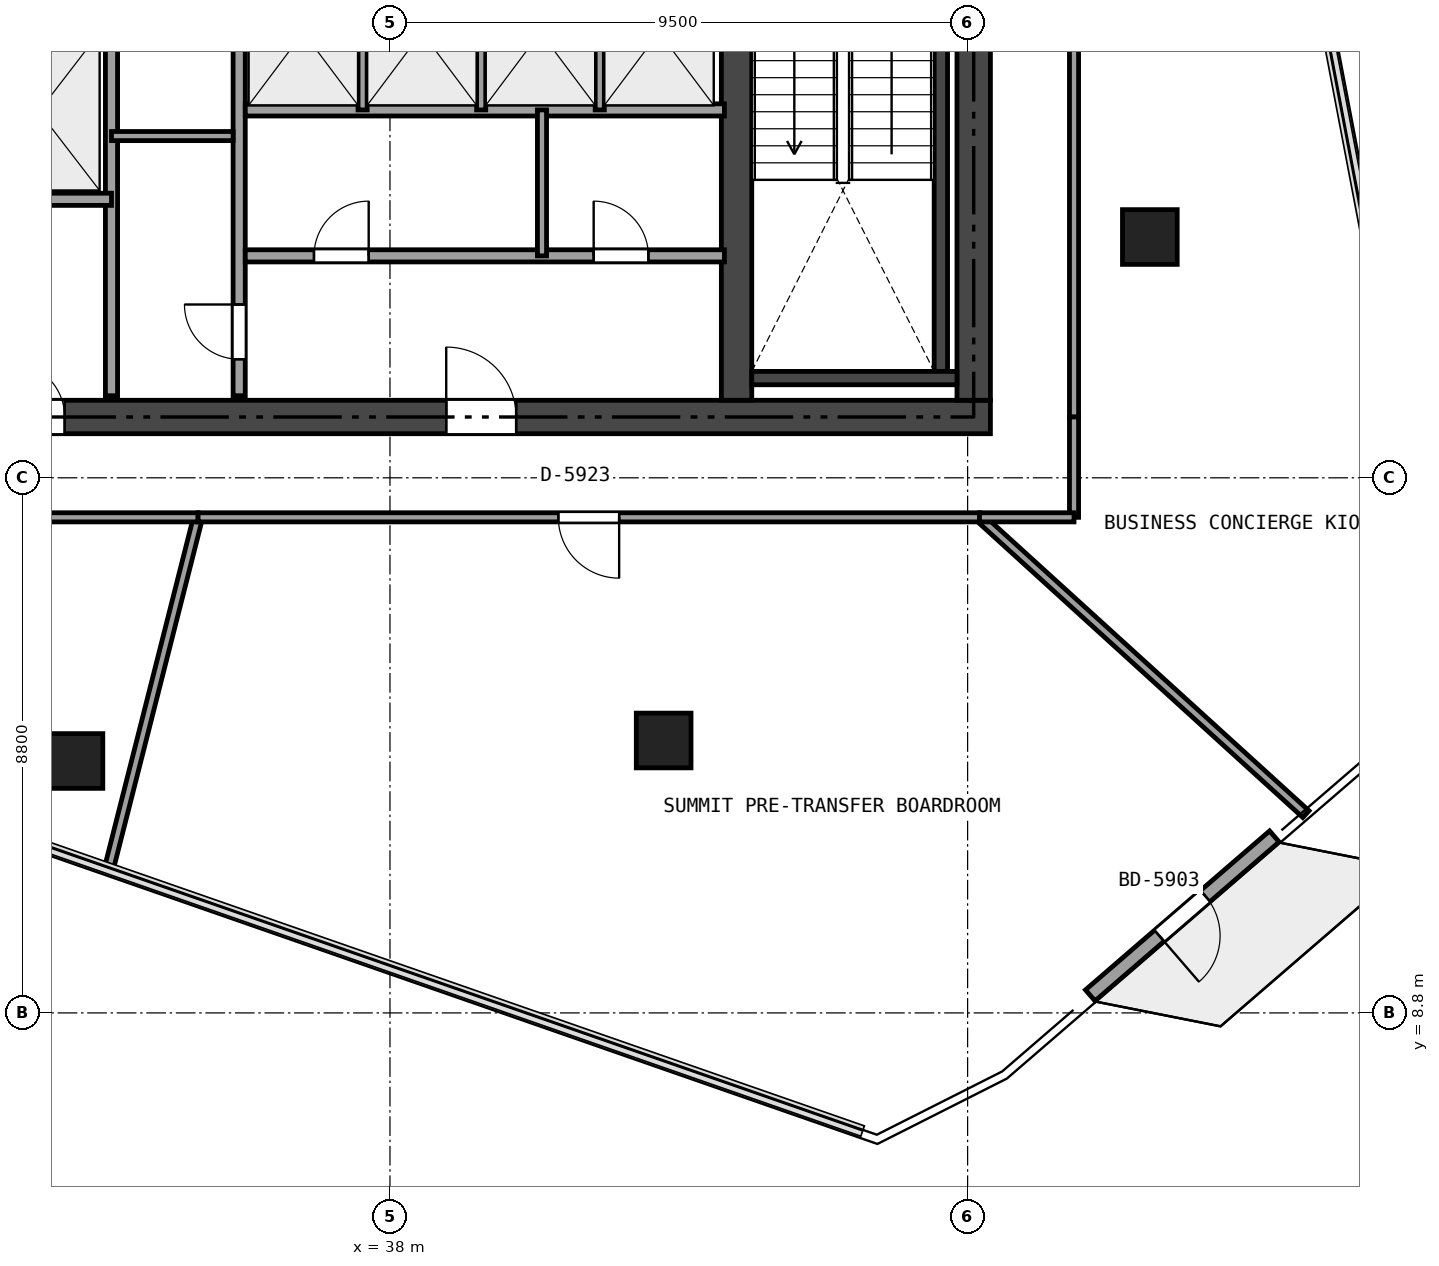
"""IFC4 building model, lengths in metres.
Left out: names, types, materials, properties, quantities, classifications, styles, units other than length and angle.
Written with IfcOpenShell. Run it as: python <this file> out.ifc"""

import sys

from ifc_helpers import new_model, si_unit, direction, frame, frame_2d, origin, origin_2d, place, context, subcontext, project, spatial, rectangle, extrude, element, fill, save


model = new_model("IFC4")
c1 = context("Model", 3, precision=1e-05, world=origin(), true_north=direction((0.0, 1.0)))
c2 = subcontext(c1, "Body", "Model", "MODEL_VIEW")
j1 = project(units=[si_unit("LENGTHUNIT", "METRE"), si_unit("PLANEANGLEUNIT", "RADIAN")], contexts=[c1])
p1 = place(None, origin())
s1 = spatial("IfcSite", under=j1, at=p1, CompositionType="ELEMENT")
p2 = place(p1, origin())
s2 = spatial("IfcBuilding", under=s1, at=p2, CompositionType="ELEMENT")
p3 = place(p2, frame((0.0, 0.0, 220.2)))
s3 = spatial("IfcBuildingStorey", under=s2, at=p3, CompositionType="ELEMENT", Elevation=220.2)
p4 = place(p3, frame((26.525, 18.6, 0.0), z_axis=(0.0, 0.0, 1.0), x_axis=(1.0, 0.0, 0.0)))
e1 = element("IfcWall", 1, at=p4, inside=s3, PredefinedType="SHEAR", context=c2, shape_type="SweptSolid", body=[
    extrude(rectangle(XDim=21.35, YDim=0.55, at=frame_2d((10.675, 0.0))), origin(), (0.0, 0.0, 1.0), 3.24),
])
p5 = place(p4, frame((12.4, 0.0, 0.0)))
e2 = element("IfcOpeningElement", 2, at=p5, cuts=e1, PredefinedType="OPENING", context=c2, shape_type="SweptSolid", body=[
    extrude(rectangle(XDim=1.15, YDim=2.15, at=frame_2d((0.575, 1.075))), frame((0.0, 0.285, 0.0), z_axis=(0.0, -1.0, 0.0), x_axis=(1.0, 0.0, 0.0)), (0.0, 0.0, 1.0), 0.57),
])
p6 = place(p4, frame((5.225, 0.0, 0.0)))
e3 = element("IfcOpeningElement", 3, at=p6, cuts=e1, PredefinedType="OPENING", context=c2, shape_type="SweptSolid", body=[
    extrude(rectangle(XDim=0.9, YDim=2.1, at=frame_2d((0.45, 1.05))), frame((0.0, 0.285, 0.0), z_axis=(0.0, -1.0, 0.0), x_axis=(1.0, 0.0, 0.0)), (0.0, 0.0, 1.0), 0.57),
])
p7 = place(p3, frame((47.6, 18.875, 0.0), z_axis=(0.0, 0.0, 1.0), x_axis=(0.0, 1.0, 0.0)))
e4 = element("IfcWall", 4, at=p7, inside=s3, PredefinedType="SHEAR", context=c2, shape_type="SweptSolid", body=[
    extrude(rectangle(XDim=15.05, YDim=0.55, at=frame_2d((7.525, 0.0))), origin(), (0.0, 0.0, 1.0), 3.24),
])
p8 = place(p7, frame((6.625, 0.0, 0.0)))
e5 = element("IfcOpeningElement", 5, at=p8, cuts=e4, PredefinedType="OPENING", context=c2, shape_type="SweptSolid", body=[
    extrude(rectangle(XDim=1.1, YDim=2.15, at=frame_2d((0.55, 1.075))), frame((0.0, 0.285, 0.0), z_axis=(0.0, -1.0, 0.0), x_axis=(1.0, 0.0, 0.0)), (0.0, 0.0, 1.0), 0.57),
])
p9 = place(p7, frame((8.525, 0.0, 0.0)))
e6 = element("IfcOpeningElement", 6, at=p9, cuts=e4, PredefinedType="OPENING", context=c2, shape_type="SweptSolid", body=[
    extrude(rectangle(XDim=0.9, YDim=2.1, at=frame_2d((0.45, 1.05))), frame((0.0, 0.285, 0.0), z_axis=(0.0, -1.0, 0.0), x_axis=(1.0, 0.0, 0.0)), (0.0, 0.0, 1.0), 0.57),
])
p10 = place(p7, frame((13.175, 0.0, 0.0)))
e7 = element("IfcOpeningElement", 7, at=p10, cuts=e4, PredefinedType="OPENING", context=c2, shape_type="SweptSolid", body=[
    extrude(rectangle(XDim=0.9, YDim=2.1, at=frame_2d((0.45, 1.05))), frame((0.0, 0.285, 0.0), z_axis=(0.0, -1.0, 0.0), x_axis=(1.0, 0.0, 0.0)), (0.0, 0.0, 1.0), 0.57),
])
p11 = place(p3, frame((43.7, 18.875, 0.0), z_axis=(0.0, 0.0, 1.0), x_axis=(0.0, 1.0, 0.0)))
e8 = element("IfcWall", 8, at=p11, inside=s3, PredefinedType="SHEAR", context=c2, shape_type="SweptSolid", body=[
    extrude(rectangle(XDim=15.05, YDim=0.5, at=frame_2d((7.525, 0.0))), origin(), (0.0, 0.0, 1.0), 3.24),
])
p12 = place(p11, frame((8.125, 0.0, 0.0)))
e9 = element("IfcOpeningElement", 9, at=p12, cuts=e8, PredefinedType="OPENING", context=c2, shape_type="SweptSolid", body=[
    extrude(rectangle(XDim=0.9, YDim=2.1, at=frame_2d((0.45, 1.05))), frame((0.0, 0.26, 0.0), z_axis=(0.0, -1.0, 0.0), x_axis=(1.0, 0.0, 0.0)), (0.0, 0.0, 1.0), 0.52),
])
p13 = place(p3, frame((47.06, 19.35, 0.0), z_axis=(0.0, 0.0, 1.0), x_axis=(0.0, 1.0, 0.0)))
e10 = element("IfcWall", 10, at=p13, inside=s3, PredefinedType="SHEAR", context=c2, shape_type="SweptSolid", body=[
    extrude(rectangle(XDim=5.9, YDim=0.22, at=frame_2d((2.95, 0.0))), origin(), (0.0, 0.0, 1.0), 3.24),
])
p14 = place(p3, frame((43.95, 19.24, 0.0), z_axis=(0.0, 0.0, 1.0), x_axis=(1.0, 0.0, 0.0)))
e11 = element("IfcWall", 11, at=p14, inside=s3, PredefinedType="SHEAR", context=c2, shape_type="SweptSolid", body=[
    extrude(rectangle(XDim=3.375, YDim=0.22, at=frame_2d((1.688, 0.0))), origin(), (0.0, 0.0, 1.0), 3.24),
])
for number, where, z_axis, x_axis in (
    (12, (32.827, 12.943, 0.0), (0.0, 0.0, 1.0), (1.0, 0.0, 0.0)),
    (13, (42.501, 13.28, 0.0), (0.0, 0.0, 1.0), (1.0, 0.0, 0.0)),
    (14, (50.497, 21.56, 0.0), (0.0, 0.0, 1.0), (1.0, 0.0, 0.0)),
):
    element("IfcColumn", number, at=place(p3, frame(where, z_axis=z_axis, x_axis=x_axis)), inside=s3, PredefinedType="COLUMN", context=c2, shape_type="SweptSolid", body=[
        extrude(rectangle(XDim=0.9, YDim=0.9, at=origin_2d()), origin(), (0.0, 0.0, 1.0), 3.24),
    ])
p15 = place(p3, frame((52.545, 11.702, 0.0), z_axis=(0.0, 0.0, 1.0), x_axis=(-0.756938273596, -0.653486380857, 0.0)))
e15 = element("IfcWall", 15, at=p15, inside=s3, PredefinedType="SOLIDWALL", context=c2, shape_type="SweptSolid", body=[
    extrude(rectangle(XDim=4.0, YDim=0.24, at=frame_2d((2.0, 0.0))), origin(), (0.0, 0.0, 1.0), 3.24),
])
p16 = place(p15, frame((1.5, 0.0, 0.0)))
e16 = element("IfcOpeningElement", 16, at=p16, cuts=e15, PredefinedType="OPENING", context=c2, shape_type="SweptSolid", body=[
    extrude(rectangle(XDim=1.0, YDim=2.15, at=frame_2d((0.5, 1.075))), frame((0.0, 0.13, 0.0), z_axis=(0.0, -1.0, 0.0), x_axis=(1.0, 0.0, 0.0)), (0.0, 0.0, 1.0), 0.26),
])
p17 = place(p3, frame((35.52, 18.95, 0.0), z_axis=(0.0, 0.0, 1.0), x_axis=(0.0, 1.0, 0.0)))
e17 = element("IfcWall", 17, at=p17, inside=s3, PredefinedType="SOLIDWALL", context=c2, shape_type="SweptSolid", body=[
    extrude(rectangle(XDim=14.9, YDim=0.2, at=frame_2d((7.45, 0.0))), origin(), (0.0, 0.0, 1.0), 2.761),
])
p18 = place(p17, frame((7.755, 0.0, 0.0)))
e18 = element("IfcOpeningElement", 18, at=p18, cuts=e17, PredefinedType="OPENING", context=c2, shape_type="SweptSolid", body=[
    extrude(rectangle(XDim=0.95, YDim=2.15, at=frame_2d((0.475, 1.075))), frame((0.0, 0.11, 0.0), z_axis=(0.0, -1.0, 0.0), x_axis=(1.0, 0.0, 0.0)), (0.0, 0.0, 1.0), 0.22),
])
p19 = place(p17, frame((0.6, 0.0, 0.0)))
e19 = element("IfcOpeningElement", 19, at=p19, cuts=e17, PredefinedType="OPENING", context=c2, shape_type="SweptSolid", body=[
    extrude(rectangle(XDim=0.9, YDim=2.1, at=frame_2d((0.45, 1.05))), frame((0.0, 0.11, 0.0), z_axis=(0.0, -1.0, 0.0), x_axis=(1.0, 0.0, 0.0)), (0.0, 0.0, 1.0), 0.22),
])
p20 = place(p3, frame((33.42, 18.95, 0.0), z_axis=(0.0, 0.0, 1.0), x_axis=(0.0, 1.0, 0.0)))
e20 = element("IfcWall", 20, at=p20, inside=s3, PredefinedType="SOLIDWALL", context=c2, shape_type="SweptSolid", body=[
    extrude(rectangle(XDim=6.13, YDim=0.2, at=frame_2d((3.065, 0.0))), origin(), (0.0, 0.0, 1.0), 2.761),
])
p21 = place(p3, frame((31.0, 22.18, 0.0), z_axis=(0.0, 0.0, 1.0), x_axis=(1.0, 0.0, 0.0)))
e21 = element("IfcWall", 21, at=p21, inside=s3, PredefinedType="SOLIDWALL", context=c2, shape_type="SweptSolid", body=[
    extrude(rectangle(XDim=2.42, YDim=0.2, at=frame_2d((1.21, 0.0))), origin(), (0.0, 0.0, 1.0), 3.24),
])
p22 = place(p3, frame((33.42, 23.22, 0.0), z_axis=(0.0, 0.0, 1.0), x_axis=(1.0, 0.0, 0.0)))
e22 = element("IfcWall", 22, at=p22, inside=s3, PredefinedType="PARTITIONING", context=c2, shape_type="SweptSolid", body=[
    extrude(rectangle(XDim=2.0, YDim=0.15, at=frame_2d((1.0, 0.0))), origin(), (0.0, 0.0, 1.0), 3.24),
])
p23 = place(p3, frame((35.62, 23.65, 0.0), z_axis=(0.0, 0.0, 1.0), x_axis=(1.0, 0.0, 0.0)))
e23 = element("IfcWall", 23, at=p23, inside=s3, PredefinedType="SOLIDWALL", context=c2, shape_type="SweptSolid", body=[
    extrude(rectangle(XDim=7.88, YDim=0.2, at=frame_2d((3.94, 0.0))), origin(), (0.0, 0.0, 1.0), 2.761),
])
p24 = place(p3, frame((35.62, 21.25, 0.0), z_axis=(0.0, 0.0, 1.0), x_axis=(1.0, 0.0, 0.0)))
e24 = element("IfcWall", 24, at=p24, inside=s3, PredefinedType="SOLIDWALL", context=c2, shape_type="SweptSolid", body=[
    extrude(rectangle(XDim=7.88, YDim=0.2, at=frame_2d((3.94, 0.0))), origin(), (0.0, 0.0, 1.0), 3.24),
])
p25 = place(p24, frame((1.13, 0.0, 0.0)))
e25 = element("IfcOpeningElement", 25, at=p25, cuts=e24, PredefinedType="OPENING", context=c2, shape_type="SweptSolid", body=[
    extrude(rectangle(XDim=0.9, YDim=2.1, at=frame_2d((0.45, 1.05))), frame((0.0, 0.11, 0.0), z_axis=(0.0, -1.0, 0.0), x_axis=(1.0, 0.0, 0.0)), (0.0, 0.0, 1.0), 0.22),
])
p26 = place(p24, frame((5.73, 0.0, 0.0)))
e26 = element("IfcOpeningElement", 26, at=p26, cuts=e24, PredefinedType="OPENING", context=c2, shape_type="SweptSolid", body=[
    extrude(rectangle(XDim=0.9, YDim=2.1, at=frame_2d((0.45, 1.05))), frame((0.0, 0.11, 0.0), z_axis=(0.0, -1.0, 0.0), x_axis=(1.0, 0.0, 0.0)), (0.0, 0.0, 1.0), 0.22),
])
for number, where, z_axis, x_axis in (
    (27, (37.55, 23.65, 0.0), (0.0, 0.0, 1.0), (0.0, 1.0, 0.0)),
    (28, (39.5, 23.65, 0.0), (0.0, 0.0, 1.0), (0.0, 1.0, 0.0)),
    (29, (41.45, 23.65, 0.0), (0.0, 0.0, 1.0), (0.0, 1.0, 0.0)),
):
    element("IfcWall", number, at=place(p3, frame(where, z_axis=z_axis, x_axis=x_axis)), inside=s3, PredefinedType="PARTITIONING", context=c2, shape_type="SweptSolid", body=[
        extrude(rectangle(XDim=2.55, YDim=0.15, at=frame_2d((1.275, 0.0))), origin(), (0.0, 0.0, 1.0), 2.761),
    ])
p27 = place(p3, frame((40.5, 21.25, 0.0), z_axis=(0.0, 0.0, 1.0), x_axis=(0.0, 1.0, 0.0)))
e30 = element("IfcWall", 30, at=p27, inside=s3, PredefinedType="PARTITIONING", context=c2, shape_type="SweptSolid", body=[
    extrude(rectangle(XDim=2.4, YDim=0.15, at=frame_2d((1.2, 0.0))), origin(), (0.0, 0.0, 1.0), 2.761),
])
p28 = place(p3, frame((33.367, 11.134, 0.0), z_axis=(0.0, 0.0, 1.0), x_axis=(0.246152632785, 0.969231077387, 0.0)))
e31 = element("IfcWall", 31, at=p28, inside=s3, PredefinedType="PARTITIONING", context=c2, shape_type="SweptSolid", body=[
    extrude(rectangle(XDim=6.0, YDim=0.15, at=frame_2d((3.0, 0.0))), origin(), (0.0, 0.0, 1.0), 2.825),
])
p29 = place(p3, frame((34.844, 16.95, 0.0), z_axis=(0.0, 0.0, 1.0), x_axis=(-1.0, 0.0, 0.0)))
e32 = element("IfcWall", 32, at=p29, inside=s3, PredefinedType="PARTITIONING", context=c2, shape_type="SweptSolid", body=[
    extrude(rectangle(XDim=8.044, YDim=0.15, at=frame_2d((4.022, 0.0))), origin(), (0.0, 0.0, 1.0), 2.617),
])
p30 = place(p29, frame((3.522, 0.0, 0.0)))
e33 = element("IfcOpeningElement", 33, at=p30, cuts=e32, PredefinedType="OPENING", context=c2, shape_type="SweptSolid", body=[
    extrude(rectangle(XDim=1.0, YDim=2.15, at=frame_2d((0.5, 1.075))), frame((0.0, 0.085, 0.0), z_axis=(0.0, -1.0, 0.0), x_axis=(1.0, 0.0, 0.0)), (0.0, 0.0, 1.0), 0.17),
])
p31 = place(p3, frame((53.064, 12.069, 0.0), z_axis=(0.0, 0.0, 1.0), x_axis=(-0.739937028387, 0.672676143491, 0.0)))
e34 = element("IfcWall", 34, at=p31, inside=s3, PredefinedType="PARTITIONING", context=c2, shape_type="SweptSolid", body=[
    extrude(rectangle(XDim=7.256, YDim=0.15, at=frame_2d((3.628, 0.0))), origin(), (0.0, 0.0, 1.0), 3.24),
])
p32 = place(p3, frame((47.695, 16.95, 0.0), z_axis=(0.0, 0.0, 1.0), x_axis=(-1.0, 0.0, 0.0)))
e35 = element("IfcWall", 35, at=p32, inside=s3, PredefinedType="PARTITIONING", context=c2, shape_type="SweptSolid", body=[
    extrude(rectangle(XDim=12.851, YDim=0.15, at=frame_2d((6.426, 0.0))), origin(), (0.0, 0.0, 1.0), 2.617),
])
p33 = place(p32, frame((5.926, 0.0, 0.0)))
e36 = element("IfcOpeningElement", 36, at=p33, cuts=e35, PredefinedType="OPENING", context=c2, shape_type="SweptSolid", body=[
    extrude(rectangle(XDim=1.0, YDim=2.15, at=frame_2d((0.5, 1.075))), frame((0.0, 0.085, 0.0), z_axis=(0.0, -1.0, 0.0), x_axis=(1.0, 0.0, 0.0)), (0.0, 0.0, 1.0), 0.17),
])
p34 = place(p3, frame((49.25, 34.2, 0.0), z_axis=(0.0, 0.0, 1.0), x_axis=(0.0, -1.0, 0.0)))
e37 = element("IfcWall", 37, at=p34, inside=s3, PredefinedType="PARTITIONING", context=c2, shape_type="SweptSolid", body=[
    extrude(rectangle(XDim=15.6, YDim=0.15, at=frame_2d((7.8, 0.0))), origin(), (0.0, 0.0, 1.0), 2.617),
])
p35 = place(p34, frame((7.3, 0.0, 0.0)))
e38 = element("IfcOpeningElement", 38, at=p35, cuts=e37, PredefinedType="OPENING", context=c2, shape_type="SweptSolid", body=[
    extrude(rectangle(XDim=1.0, YDim=2.15, at=frame_2d((0.5, 1.075))), frame((0.0, 0.085, 0.0), z_axis=(0.0, -1.0, 0.0), x_axis=(1.0, 0.0, 0.0)), (0.0, 0.0, 1.0), 0.17),
])
p36 = place(p3, frame((49.25, 18.6, 0.0), z_axis=(0.0, 0.0, 1.0), x_axis=(0.0, -1.0, 0.0)))
e39 = element("IfcWall", 39, at=p36, inside=s3, PredefinedType="PARTITIONING", context=c2, shape_type="SweptSolid", body=[
    extrude(rectangle(XDim=1.65, YDim=0.15, at=frame_2d((0.825, 0.0))), origin(), (0.0, 0.0, 1.0), 3.24),
])
p37 = place(p3, frame((49.25, 16.95, 0.0), z_axis=(0.0, 0.0, 1.0), x_axis=(-1.0, 0.0, 0.0)))
e40 = element("IfcWall", 40, at=p37, inside=s3, PredefinedType="PARTITIONING", context=c2, shape_type="SweptSolid", body=[
    extrude(rectangle(XDim=1.555, YDim=0.15, at=frame_2d((0.777, 0.0))), origin(), (0.0, 0.0, 1.0), 3.24),
])
p38 = place(p16, origin())
e41 = element("IfcDoor", 41, at=p38, inside=s3, OperationType="SINGLE_SWING_RIGHT", PredefinedType="DOOR", context=c2, shape_type="SweptSolid", body=[
    extrude(rectangle(XDim=1.0, YDim=2.15, at=frame_2d((0.5, 1.075))), frame((0.0, 0.025, 0.0), z_axis=(0.0, -1.0, 0.0), x_axis=(1.0, 0.0, 0.0)), (0.0, 0.0, 1.0), 0.05),
])
fill(e16, e41)
p39 = place(p5, origin())
e42 = element("IfcDoor", 42, at=p39, inside=s3, OperationType="SINGLE_SWING_LEFT", PredefinedType="DOOR", context=c2, shape_type="SweptSolid", body=[
    extrude(rectangle(XDim=1.15, YDim=2.15, at=frame_2d((0.575, 1.075))), frame((0.0, 0.025, 0.0), z_axis=(0.0, -1.0, 0.0), x_axis=(1.0, 0.0, 0.0)), (0.0, 0.0, 1.0), 0.05),
])
fill(e2, e42)
p40 = place(p6, origin())
e43 = element("IfcDoor", 43, at=p40, inside=s3, OperationType="SINGLE_SWING_LEFT", PredefinedType="DOOR", context=c2, shape_type="SweptSolid", body=[
    extrude(rectangle(XDim=0.9, YDim=2.1, at=frame_2d((0.45, 1.05))), frame((0.0, 0.025, 0.0), z_axis=(0.0, -1.0, 0.0), x_axis=(1.0, 0.0, 0.0)), (0.0, 0.0, 1.0), 0.05),
])
fill(e3, e43)
p41 = place(p19, origin())
e44 = element("IfcDoor", 44, at=p41, inside=s3, OperationType="SINGLE_SWING_RIGHT", PredefinedType="DOOR", context=c2, shape_type="SweptSolid", body=[
    extrude(rectangle(XDim=0.9, YDim=2.1, at=frame_2d((0.45, 1.05))), frame((0.0, 0.025, 0.0), z_axis=(0.0, -1.0, 0.0), x_axis=(1.0, 0.0, 0.0)), (0.0, 0.0, 1.0), 0.05),
])
fill(e19, e44)
p42 = place(p25, origin())
e45 = element("IfcDoor", 45, at=p42, inside=s3, OperationType="SINGLE_SWING_RIGHT", PredefinedType="DOOR", context=c2, shape_type="SweptSolid", body=[
    extrude(rectangle(XDim=0.9, YDim=2.1, at=frame_2d((0.45, 1.05))), frame((0.0, 0.025, 0.0), z_axis=(0.0, -1.0, 0.0), x_axis=(1.0, 0.0, 0.0)), (0.0, 0.0, 1.0), 0.05),
])
fill(e25, e45)
p43 = place(p26, origin())
e46 = element("IfcDoor", 46, at=p43, inside=s3, OperationType="SINGLE_SWING_LEFT", PredefinedType="DOOR", context=c2, shape_type="SweptSolid", body=[
    extrude(rectangle(XDim=0.9, YDim=2.1, at=frame_2d((0.45, 1.05))), frame((0.0, 0.025, 0.0), z_axis=(0.0, -1.0, 0.0), x_axis=(1.0, 0.0, 0.0)), (0.0, 0.0, 1.0), 0.05),
])
fill(e26, e46)
p44 = place(p33, origin())
e47 = element("IfcDoor", 47, at=p44, inside=s3, OperationType="SINGLE_SWING_LEFT", PredefinedType="DOOR", context=c2, shape_type="SweptSolid", body=[
    extrude(rectangle(XDim=1.0, YDim=2.15, at=frame_2d((0.5, 1.075))), frame((0.0, 0.025, 0.0), z_axis=(0.0, -1.0, 0.0), x_axis=(1.0, 0.0, 0.0)), (0.0, 0.0, 1.0), 0.05),
])
fill(e36, e47)
save(model, sys.argv[1])
